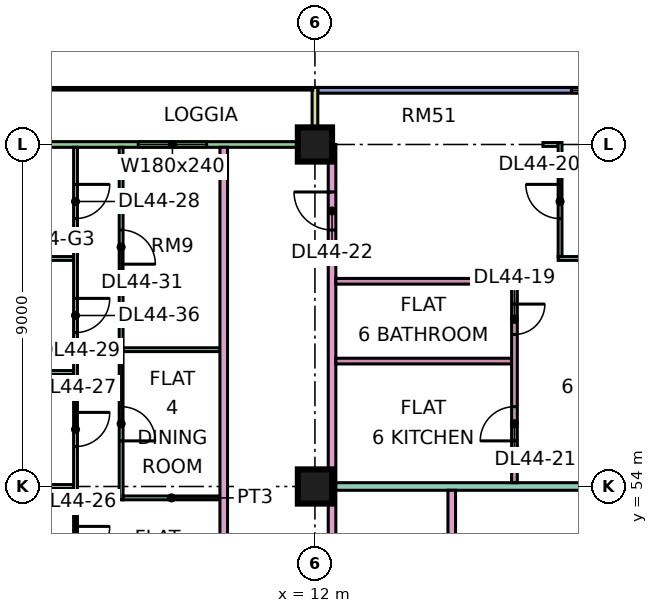
"""IFC4 building model, lengths in metres.
Left out: names, types, materials, properties, quantities, classifications, styles, units other than length and angle.
Written with IfcOpenShell. Run it as: python <this file> out.ifc"""

import sys

from ifc_helpers import new_model, si_unit, direction, frame, frame_2d, origin, origin_2d, place, context, subcontext, project, spatial, rectangle, extrude, element, fill, save


model = new_model("IFC4")
c1 = context("Model", 3, precision=1e-05, world=origin(), true_north=direction((0.0, 1.0)))
c2 = subcontext(c1, "Body", "Model", "MODEL_VIEW")
j1 = project(units=[si_unit("LENGTHUNIT", "METRE"), si_unit("PLANEANGLEUNIT", "RADIAN")], contexts=[c1])
p1 = place(None, origin())
s1 = spatial("IfcSite", under=j1, at=p1, CompositionType="ELEMENT")
p2 = place(p1, origin())
s2 = spatial("IfcBuilding", under=s1, at=p2, CompositionType="ELEMENT")
p3 = place(p2, frame((0.0, 0.0, 191.15)))
s3 = spatial("IfcBuildingStorey", under=s2, at=p3, CompositionType="ELEMENT", Elevation=191.15)
for number, where, z_axis, x_axis in (
    (1, (12.0, 54.0, 0.0), (0.0, 0.0, 1.0), (1.0, 0.0, 0.0)),
    (2, (12.0, 63.0, 0.0), (0.0, 0.0, 1.0), (1.0, 0.0, 0.0)),
):
    element("IfcColumn", number, at=place(p3, frame(where, z_axis=z_axis, x_axis=x_axis)), inside=s3, PredefinedType="COLUMN", context=c2, shape_type="SweptSolid", body=[
        extrude(rectangle(XDim=0.9, YDim=0.9, at=origin_2d()), origin(), (0.0, 0.0, 1.0), 3.75),
    ])
p4 = place(p3, frame((22.5, 64.425, 0.0), z_axis=(0.0, 0.0, 1.0), x_axis=(-1.0, 0.0, 0.0)))
e3 = element("IfcWall", 3, at=p4, inside=s3, PredefinedType="SOLIDWALL", context=c2, shape_type="SweptSolid", body=[
    extrude(rectangle(XDim=10.425, YDim=0.15, at=frame_2d((5.212, 0.0))), origin(), (0.0, 0.0, 1.0), 3.35),
])
p5 = place(p4, frame((0.75, 0.0, 0.45)))
e4 = element("IfcOpeningElement", 4, at=p5, cuts=e3, PredefinedType="OPENING", context=c2, shape_type="SweptSolid", body=[
    extrude(rectangle(XDim=3.0, YDim=2.4, at=frame_2d((1.5, 1.2))), frame((0.0, 0.085, 0.0), z_axis=(0.0, -1.0, 0.0), x_axis=(1.0, 0.0, 0.0)), (0.0, 0.0, 1.0), 0.17),
])
p6 = place(p3, frame((11.925, 63.0, 0.0), z_axis=(0.0, 0.0, 1.0), x_axis=(-1.0, 0.0, 0.0)))
e5 = element("IfcWall", 5, at=p6, inside=s3, PredefinedType="SOLIDWALL", context=c2, shape_type="SweptSolid", body=[
    extrude(rectangle(XDim=10.35, YDim=0.15, at=frame_2d((5.175, 0.0))), origin(), (0.0, 0.0, 1.0), 3.35),
])
p7 = place(p6, frame((2.775, 0.0, 0.45)))
e6 = element("IfcOpeningElement", 6, at=p7, cuts=e5, PredefinedType="OPENING", context=c2, shape_type="SweptSolid", body=[
    extrude(rectangle(XDim=1.8, YDim=2.4, at=frame_2d((0.9, 1.2))), frame((0.0, 0.085, 0.0), z_axis=(0.0, -1.0, 0.0), x_axis=(1.0, 0.0, 0.0)), (0.0, 0.0, 1.0), 0.17),
])
p8 = place(p6, frame((7.387, 0.0, 0.0)))
e7 = element("IfcOpeningElement", 7, at=p8, cuts=e5, PredefinedType="OPENING", context=c2, shape_type="SweptSolid", body=[
    extrude(rectangle(XDim=1.8, YDim=2.4, at=frame_2d((0.9, 1.2))), frame((0.0, 0.085, 0.0), z_axis=(0.0, -1.0, 0.0), x_axis=(1.0, 0.0, 0.0)), (0.0, 0.0, 1.0), 0.17),
])
p9 = place(p3, frame((12.0, 64.5, 0.0), z_axis=(0.0, 0.0, 1.0), x_axis=(0.0, -1.0, 0.0)))
e8 = element("IfcWall", 8, at=p9, inside=s3, PredefinedType="SOLIDWALL", context=c2, shape_type="SweptSolid", body=[
    extrude(rectangle(XDim=1.5, YDim=0.15, at=frame_2d((0.75, 0.0))), origin(), (0.0, 0.0, 1.0), 3.35),
])
for number, where, z_axis, x_axis in (
    (9, (0.074, 54.0, 0.0), (0.0, 0.0, 1.0), (1.0, 0.0, 0.0)),
    (10, (0.074, 57.0, 0.0), (0.0, 0.0, 1.0), (1.0, 0.0, 0.0)),
    (11, (0.074, 60.0, 0.0), (0.0, 0.0, 1.0), (1.0, 0.0, 0.0)),
):
    element("IfcWall", number, at=place(p3, frame(where, z_axis=z_axis, x_axis=x_axis)), inside=s3, PredefinedType="PARTITIONING", context=c2, shape_type="SweptSolid", body=[
        extrude(rectangle(XDim=5.576, YDim=0.1, at=frame_2d((2.788, 0.0))), origin(), (0.0, 0.0, 1.0), 3.35),
    ])
p10 = place(p3, frame((5.7, 36.1, 0.0), z_axis=(0.0, 0.0, 1.0), x_axis=(0.0, 1.0, 0.0)))
e12 = element("IfcWall", 12, at=p10, inside=s3, PredefinedType="PARTITIONING", context=c2, shape_type="SweptSolid", body=[
    extrude(rectangle(XDim=26.826, YDim=0.1, at=frame_2d((13.413, 0.0))), origin(), (0.0, 0.0, 1.0), 3.35),
])
p11 = place(p10, frame((9.95, 0.0, 0.0)))
e13 = element("IfcOpeningElement", 13, at=p11, cuts=e12, PredefinedType="OPENING", context=c2, shape_type="SweptSolid", body=[
    extrude(rectangle(XDim=0.9, YDim=2.1, at=frame_2d((0.45, 1.05))), frame((0.0, 0.06, 0.0), z_axis=(0.0, -1.0, 0.0), x_axis=(1.0, 0.0, 0.0)), (0.0, 0.0, 1.0), 0.12),
])
p12 = place(p10, frame((12.95, 0.0, 0.0)))
e14 = element("IfcOpeningElement", 14, at=p12, cuts=e12, PredefinedType="OPENING", context=c2, shape_type="SweptSolid", body=[
    extrude(rectangle(XDim=0.9, YDim=2.1, at=frame_2d((0.45, 1.05))), frame((0.0, 0.06, 0.0), z_axis=(0.0, -1.0, 0.0), x_axis=(1.0, 0.0, 0.0)), (0.0, 0.0, 1.0), 0.12),
])
p13 = place(p10, frame((15.95, 0.0, 0.0)))
e15 = element("IfcOpeningElement", 15, at=p13, cuts=e12, PredefinedType="OPENING", context=c2, shape_type="SweptSolid", body=[
    extrude(rectangle(XDim=0.9, YDim=2.1, at=frame_2d((0.45, 1.05))), frame((0.0, 0.06, 0.0), z_axis=(0.0, -1.0, 0.0), x_axis=(1.0, 0.0, 0.0)), (0.0, 0.0, 1.0), 0.12),
])
p14 = place(p10, frame((18.95, 0.0, 0.0)))
e16 = element("IfcOpeningElement", 16, at=p14, cuts=e12, PredefinedType="OPENING", context=c2, shape_type="SweptSolid", body=[
    extrude(rectangle(XDim=0.9, YDim=2.1, at=frame_2d((0.45, 1.05))), frame((0.0, 0.06, 0.0), z_axis=(0.0, -1.0, 0.0), x_axis=(1.0, 0.0, 0.0)), (0.0, 0.0, 1.0), 0.12),
])
p15 = place(p10, frame((24.95, 0.0, 0.0)))
e17 = element("IfcOpeningElement", 17, at=p15, cuts=e12, PredefinedType="OPENING", context=c2, shape_type="SweptSolid", body=[
    extrude(rectangle(XDim=0.9, YDim=2.1, at=frame_2d((0.45, 1.05))), frame((0.0, 0.06, 0.0), z_axis=(0.0, -1.0, 0.0), x_axis=(1.0, 0.0, 0.0)), (0.0, 0.0, 1.0), 0.12),
])
p16 = place(p10, frame((3.95, 0.0, 0.0)))
e18 = element("IfcOpeningElement", 18, at=p16, cuts=e12, PredefinedType="OPENING", context=c2, shape_type="SweptSolid", body=[
    extrude(rectangle(XDim=0.9, YDim=2.1, at=frame_2d((0.45, 1.05))), frame((0.0, 0.06, 0.0), z_axis=(0.0, -1.0, 0.0), x_axis=(1.0, 0.0, 0.0)), (0.0, 0.0, 1.0), 0.12),
])
p17 = place(p10, frame((21.95, 0.0, 0.0)))
e19 = element("IfcOpeningElement", 19, at=p17, cuts=e12, PredefinedType="OPENING", context=c2, shape_type="SweptSolid", body=[
    extrude(rectangle(XDim=0.9, YDim=2.1, at=frame_2d((0.45, 1.05))), frame((0.0, 0.06, 0.0), z_axis=(0.0, -1.0, 0.0), x_axis=(1.0, 0.0, 0.0)), (0.0, 0.0, 1.0), 0.12),
])
p18 = place(p3, frame((6.9, 53.65, 0.0), z_axis=(0.0, 0.0, 1.0), x_axis=(0.0, 1.0, 0.0)))
e20 = element("IfcWall", 20, at=p18, inside=s3, PredefinedType="PARTITIONING", context=c2, shape_type="SweptSolid", body=[
    extrude(rectangle(XDim=9.276, YDim=0.1, at=frame_2d((4.638, 0.0))), origin(), (0.0, 0.0, 1.0), 3.35),
])
p19 = place(p18, frame((1.55, 0.0, 0.0)))
e21 = element("IfcOpeningElement", 21, at=p19, cuts=e20, PredefinedType="OPENING", context=c2, shape_type="SweptSolid", body=[
    extrude(rectangle(XDim=0.9, YDim=2.1, at=frame_2d((0.45, 1.05))), frame((0.0, 0.06, 0.0), z_axis=(0.0, -1.0, 0.0), x_axis=(1.0, 0.0, 0.0)), (0.0, 0.0, 1.0), 0.12),
])
p20 = place(p18, frame((6.2, 0.0, 0.0)))
e22 = element("IfcOpeningElement", 22, at=p20, cuts=e20, PredefinedType="OPENING", context=c2, shape_type="SweptSolid", body=[
    extrude(rectangle(XDim=0.9, YDim=2.1, at=frame_2d((0.45, 1.05))), frame((0.0, 0.06, 0.0), z_axis=(0.0, -1.0, 0.0), x_axis=(1.0, 0.0, 0.0)), (0.0, 0.0, 1.0), 0.12),
])
for number, where, z_axis, x_axis in (
    (23, (6.95, 53.7, 0.0), (0.0, 0.0, 1.0), (1.0, 0.0, 0.0)),
    (24, (6.95, 57.6, 0.0), (0.0, 0.0, 1.0), (1.0, 0.0, 0.0)),
):
    element("IfcWall", number, at=place(p3, frame(where, z_axis=z_axis, x_axis=x_axis)), inside=s3, PredefinedType="PARTITIONING", context=c2, shape_type="SweptSolid", body=[
        extrude(rectangle(XDim=2.55, YDim=0.1, at=frame_2d((1.275, 0.0))), origin(), (0.0, 0.0, 1.0), 3.35),
    ])
p21 = place(p3, frame((9.6, 20.0, 0.0), z_axis=(0.0, 0.0, 1.0), x_axis=(0.0, 1.0, 0.0)))
e25 = element("IfcWall", 25, at=p21, inside=s3, PredefinedType="PARTITIONING", context=c2, shape_type="SweptSolid", body=[
    extrude(rectangle(XDim=42.926, YDim=0.2, at=frame_2d((21.463, 0.0))), origin(), (0.0, 0.0, 1.0), 3.35),
])
p22 = place(p21, frame((31.65, 0.0, 0.0)))
e26 = element("IfcOpeningElement", 26, at=p22, cuts=e25, PredefinedType="OPENING", context=c2, shape_type="SweptSolid", body=[
    extrude(rectangle(XDim=1.0, YDim=2.1, at=frame_2d((0.5, 1.05))), frame((0.0, 0.11, 0.0), z_axis=(0.0, -1.0, 0.0), x_axis=(1.0, 0.0, 0.0)), (0.0, 0.0, 1.0), 0.22),
])
p23 = place(p21, frame((0.6, 0.0, 0.0)))
e27 = element("IfcOpeningElement", 27, at=p23, cuts=e25, PredefinedType="OPENING", context=c2, shape_type="SweptSolid", body=[
    extrude(rectangle(XDim=1.2, YDim=2.1, at=frame_2d((0.6, 1.05))), frame((0.0, 0.11, 0.0), z_axis=(0.0, -1.0, 0.0), x_axis=(1.0, 0.0, 0.0)), (0.0, 0.0, 1.0), 0.22),
])
p24 = place(p21, frame((13.65, 0.0, 0.0)))
e28 = element("IfcOpeningElement", 28, at=p24, cuts=e25, PredefinedType="OPENING", context=c2, shape_type="SweptSolid", body=[
    extrude(rectangle(XDim=1.0, YDim=2.1, at=frame_2d((0.5, 1.05))), frame((0.0, 0.11, 0.0), z_axis=(0.0, -1.0, 0.0), x_axis=(1.0, 0.0, 0.0)), (0.0, 0.0, 1.0), 0.22),
])
p25 = place(p3, frame((12.45, 20.0, 0.0), z_axis=(0.0, 0.0, 1.0), x_axis=(0.0, 1.0, 0.0)))
e29 = element("IfcWall", 29, at=p25, inside=s3, PredefinedType="PARTITIONING", context=c2, shape_type="SweptSolid", body=[
    extrude(rectangle(XDim=43.0, YDim=0.2, at=frame_2d((21.5, 0.0))), origin(), (0.0, 0.0, 1.0), 3.35),
])
p26 = place(p25, frame((6.7, 0.0, 0.0)))
e30 = element("IfcOpeningElement", 30, at=p26, cuts=e29, PredefinedType="OPENING", context=c2, shape_type="SweptSolid", body=[
    extrude(rectangle(XDim=1.6, YDim=2.1, at=frame_2d((0.8, 1.05))), frame((0.0, 0.11, 0.0), z_axis=(0.0, -1.0, 0.0), x_axis=(1.0, 0.0, 0.0)), (0.0, 0.0, 1.0), 0.22),
])
p27 = place(p25, frame((12.95, 0.0, 0.0)))
e31 = element("IfcOpeningElement", 31, at=p27, cuts=e29, PredefinedType="OPENING", context=c2, shape_type="SweptSolid", body=[
    extrude(rectangle(XDim=1.0, YDim=2.1, at=frame_2d((0.5, 1.05))), frame((0.0, 0.11, 0.0), z_axis=(0.0, -1.0, 0.0), x_axis=(1.0, 0.0, 0.0)), (0.0, 0.0, 1.0), 0.22),
])
p28 = place(p25, frame((16.9, 0.0, 0.0)))
e32 = element("IfcOpeningElement", 32, at=p28, cuts=e29, PredefinedType="OPENING", context=c2, shape_type="SweptSolid", body=[
    extrude(rectangle(XDim=1.0, YDim=2.1, at=frame_2d((0.5, 1.05))), frame((0.0, 0.11, 0.0), z_axis=(0.0, -1.0, 0.0), x_axis=(1.0, 0.0, 0.0)), (0.0, 0.0, 1.0), 0.22),
])
p29 = place(p25, frame((40.75, 0.0, 0.0)))
e33 = element("IfcOpeningElement", 33, at=p29, cuts=e29, PredefinedType="OPENING", context=c2, shape_type="SweptSolid", body=[
    extrude(rectangle(XDim=1.0, YDim=2.1, at=frame_2d((0.5, 1.05))), frame((0.0, 0.11, 0.0), z_axis=(0.0, -1.0, 0.0), x_axis=(1.0, 0.0, 0.0)), (0.0, 0.0, 1.0), 0.22),
])
p30 = place(p25, frame((1.15, 0.0, 0.0)))
e34 = element("IfcOpeningElement", 34, at=p30, cuts=e29, PredefinedType="OPENING", context=c2, shape_type="SweptSolid", body=[
    extrude(rectangle(XDim=1.8, YDim=2.1, at=frame_2d((0.9, 1.05))), frame((0.0, 0.11, 0.0), z_axis=(0.0, -1.0, 0.0), x_axis=(1.0, 0.0, 0.0)), (0.0, 0.0, 1.0), 0.22),
])
p31 = place(p25, frame((28.6, 0.0, 0.0)))
e35 = element("IfcOpeningElement", 35, at=p31, cuts=e29, PredefinedType="OPENING", context=c2, shape_type="SweptSolid", body=[
    extrude(rectangle(XDim=1.8, YDim=2.1, at=frame_2d((0.9, 1.05))), frame((0.0, 0.11, 0.0), z_axis=(0.0, -1.0, 0.0), x_axis=(1.0, 0.0, 0.0)), (0.0, 0.0, 1.0), 0.22),
])
p32 = place(p3, frame((12.55, 54.0, 0.0), z_axis=(0.0, 0.0, 1.0), x_axis=(1.0, 0.0, 0.0)))
e36 = element("IfcWall", 36, at=p32, inside=s3, PredefinedType="PARTITIONING", context=c2, shape_type="SweptSolid", body=[
    extrude(rectangle(XDim=11.376, YDim=0.2, at=frame_2d((5.688, 0.0))), origin(), (0.0, 0.0, 1.0), 3.35),
])
for number, where, z_axis, x_axis in (
    (37, (12.55, 57.3, 0.0), (0.0, 0.0, 1.0), (1.0, 0.0, 0.0)),
    (38, (12.55, 59.4, 0.0), (0.0, 0.0, 1.0), (1.0, 0.0, 0.0)),
):
    element("IfcWall", number, at=place(p3, frame(where, z_axis=z_axis, x_axis=x_axis)), inside=s3, PredefinedType="PARTITIONING", context=c2, shape_type="SweptSolid", body=[
        extrude(rectangle(XDim=4.625, YDim=0.15, at=frame_2d((2.312, 0.0))), origin(), (0.0, 0.0, 1.0), 3.35),
    ])
p33 = place(p3, frame((15.6, 51.225, 0.0), z_axis=(0.0, 0.0, 1.0), x_axis=(0.0, 1.0, 0.0)))
e39 = element("IfcWall", 39, at=p33, inside=s3, PredefinedType="PARTITIONING", context=c2, shape_type="SweptSolid", body=[
    extrude(rectangle(XDim=2.675, YDim=0.2, at=frame_2d((1.337, 0.0))), origin(), (0.0, 0.0, 1.0), 3.35),
])
p34 = place(p3, frame((17.25, 54.1, 0.0), z_axis=(0.0, 0.0, 1.0), x_axis=(0.0, 1.0, 0.0)))
e40 = element("IfcWall", 40, at=p34, inside=s3, PredefinedType="PARTITIONING", context=c2, shape_type="SweptSolid", body=[
    extrude(rectangle(XDim=5.375, YDim=0.15, at=frame_2d((2.688, 0.0))), origin(), (0.0, 0.0, 1.0), 3.35),
])
p35 = place(p34, frame((3.9, 0.0, 0.0)))
e41 = element("IfcOpeningElement", 41, at=p35, cuts=e40, PredefinedType="OPENING", context=c2, shape_type="SweptSolid", body=[
    extrude(rectangle(XDim=0.8, YDim=2.1, at=frame_2d((0.4, 1.05))), frame((0.0, 0.085, 0.0), z_axis=(0.0, -1.0, 0.0), x_axis=(1.0, 0.0, 0.0)), (0.0, 0.0, 1.0), 0.17),
])
p36 = place(p34, frame((1.1, 0.0, 0.0)))
e42 = element("IfcOpeningElement", 42, at=p36, cuts=e40, PredefinedType="OPENING", context=c2, shape_type="SweptSolid", body=[
    extrude(rectangle(XDim=0.9, YDim=2.1, at=frame_2d((0.45, 1.05))), frame((0.0, 0.085, 0.0), z_axis=(0.0, -1.0, 0.0), x_axis=(1.0, 0.0, 0.0)), (0.0, 0.0, 1.0), 0.17),
])
p37 = place(p3, frame((18.0, 63.0, 0.0), z_axis=(0.0, 0.0, 1.0), x_axis=(1.0, 0.0, 0.0)))
e43 = element("IfcWall", 43, at=p37, inside=s3, PredefinedType="PARTITIONING", context=c2, shape_type="SweptSolid", body=[
    extrude(rectangle(XDim=0.4, YDim=0.1, at=frame_2d((0.2, 0.0))), origin(), (0.0, 0.0, 1.0), 3.35),
])
p38 = place(p3, frame((18.4, 60.0, 0.0), z_axis=(0.0, 0.0, 1.0), x_axis=(1.0, 0.0, 0.0)))
e44 = element("IfcWall", 44, at=p38, inside=s3, PredefinedType="PARTITIONING", context=c2, shape_type="SweptSolid", body=[
    extrude(rectangle(XDim=5.526, YDim=0.1, at=frame_2d((2.763, 0.0))), origin(), (0.0, 0.0, 1.0), 3.35),
])
p39 = place(p3, frame((18.45, 60.05, 0.0), z_axis=(0.0, 0.0, 1.0), x_axis=(0.0, 1.0, 0.0)))
e45 = element("IfcWall", 45, at=p39, inside=s3, PredefinedType="PARTITIONING", context=c2, shape_type="SweptSolid", body=[
    extrude(rectangle(XDim=3.0, YDim=0.1, at=frame_2d((1.5, 0.0))), origin(), (0.0, 0.0, 1.0), 3.35),
])
p40 = place(p39, frame((1.0, 0.0, 0.0)))
e46 = element("IfcOpeningElement", 46, at=p40, cuts=e45, PredefinedType="OPENING", context=c2, shape_type="SweptSolid", body=[
    extrude(rectangle(XDim=0.9, YDim=2.1, at=frame_2d((0.45, 1.05))), frame((0.0, 0.06, 0.0), z_axis=(0.0, -1.0, 0.0), x_axis=(1.0, 0.0, 0.0)), (0.0, 0.0, 1.0), 0.12),
])
p41 = place(p5, origin())
e47 = element("IfcWindow", 47, at=p41, inside=s3, PartitioningType="SINGLE_PANEL", PredefinedType="WINDOW", context=c2, shape_type="SweptSolid", body=[
    extrude(rectangle(XDim=3.0, YDim=2.4, at=frame_2d((1.5, 1.2))), frame((0.0, 0.03, 0.0), z_axis=(0.0, -1.0, 0.0), x_axis=(1.0, 0.0, 0.0)), (0.0, 0.0, 1.0), 0.06),
])
fill(e4, e47)
p42 = place(p7, origin())
e48 = element("IfcWindow", 48, at=p42, inside=s3, PartitioningType="SINGLE_PANEL", PredefinedType="WINDOW", context=c2, shape_type="SweptSolid", body=[
    extrude(rectangle(XDim=1.8, YDim=2.4, at=frame_2d((0.9, 1.2))), frame((0.0, 0.03, 0.0), z_axis=(0.0, -1.0, 0.0), x_axis=(1.0, 0.0, 0.0)), (0.0, 0.0, 1.0), 0.06),
])
fill(e6, e48)
p43 = place(p35, origin())
e49 = element("IfcDoor", 49, at=p43, inside=s3, OperationType="SINGLE_SWING_RIGHT", PredefinedType="DOOR", context=c2, shape_type="SweptSolid", body=[
    extrude(rectangle(XDim=0.8, YDim=2.1, at=frame_2d((0.4, 1.05))), frame((0.0, 0.025, 0.0), z_axis=(0.0, -1.0, 0.0), x_axis=(1.0, 0.0, 0.0)), (0.0, 0.0, 1.0), 0.05),
])
fill(e41, e49)
p44 = place(p40, frame((0.9, 0.0, 0.0), z_axis=(0.0, 0.0, 1.0), x_axis=(-1.0, 0.0, 0.0)))
e50 = element("IfcDoor", 50, at=p44, inside=s3, OperationType="SINGLE_SWING_RIGHT", PredefinedType="DOOR", context=c2, shape_type="SweptSolid", body=[
    extrude(rectangle(XDim=0.9, YDim=2.1, at=frame_2d((0.45, 1.05))), frame((0.0, 0.025, 0.0), z_axis=(0.0, -1.0, 0.0), x_axis=(1.0, 0.0, 0.0)), (0.0, 0.0, 1.0), 0.05),
])
fill(e46, e50)
p45 = place(p36, origin())
e51 = element("IfcDoor", 51, at=p45, inside=s3, OperationType="SINGLE_SWING_LEFT", PredefinedType="DOOR", context=c2, shape_type="SweptSolid", body=[
    extrude(rectangle(XDim=0.9, YDim=2.1, at=frame_2d((0.45, 1.05))), frame((0.0, 0.025, 0.0), z_axis=(0.0, -1.0, 0.0), x_axis=(1.0, 0.0, 0.0)), (0.0, 0.0, 1.0), 0.05),
])
fill(e42, e51)
p46 = place(p29, frame((1.0, 0.0, 0.0), z_axis=(0.0, 0.0, 1.0), x_axis=(-1.0, 0.0, 0.0)))
e52 = element("IfcDoor", 52, at=p46, inside=s3, OperationType="SINGLE_SWING_RIGHT", PredefinedType="DOOR", context=c2, shape_type="SweptSolid", body=[
    extrude(rectangle(XDim=1.0, YDim=2.1, at=frame_2d((0.5, 1.05))), frame((0.0, 0.025, 0.0), z_axis=(0.0, -1.0, 0.0), x_axis=(1.0, 0.0, 0.0)), (0.0, 0.0, 1.0), 0.05),
])
fill(e33, e52)
p47 = place(p13, origin())
e53 = element("IfcDoor", 53, at=p47, inside=s3, OperationType="SINGLE_SWING_RIGHT", PredefinedType="DOOR", context=c2, shape_type="SweptSolid", body=[
    extrude(rectangle(XDim=0.9, YDim=2.1, at=frame_2d((0.45, 1.05))), frame((0.0, 0.025, 0.0), z_axis=(0.0, -1.0, 0.0), x_axis=(1.0, 0.0, 0.0)), (0.0, 0.0, 1.0), 0.05),
])
fill(e15, e53)
p48 = place(p14, origin())
e54 = element("IfcDoor", 54, at=p48, inside=s3, OperationType="SINGLE_SWING_RIGHT", PredefinedType="DOOR", context=c2, shape_type="SweptSolid", body=[
    extrude(rectangle(XDim=0.9, YDim=2.1, at=frame_2d((0.45, 1.05))), frame((0.0, 0.025, 0.0), z_axis=(0.0, -1.0, 0.0), x_axis=(1.0, 0.0, 0.0)), (0.0, 0.0, 1.0), 0.05),
])
fill(e16, e54)
p49 = place(p15, origin())
e55 = element("IfcDoor", 55, at=p49, inside=s3, OperationType="SINGLE_SWING_RIGHT", PredefinedType="DOOR", context=c2, shape_type="SweptSolid", body=[
    extrude(rectangle(XDim=0.9, YDim=2.1, at=frame_2d((0.45, 1.05))), frame((0.0, 0.025, 0.0), z_axis=(0.0, -1.0, 0.0), x_axis=(1.0, 0.0, 0.0)), (0.0, 0.0, 1.0), 0.05),
])
fill(e17, e55)
p50 = place(p19, frame((0.9, 0.0, 0.0), z_axis=(0.0, 0.0, 1.0), x_axis=(-1.0, 0.0, 0.0)))
e56 = element("IfcDoor", 56, at=p50, inside=s3, OperationType="SINGLE_SWING_LEFT", PredefinedType="DOOR", context=c2, shape_type="SweptSolid", body=[
    extrude(rectangle(XDim=0.9, YDim=2.1, at=frame_2d((0.45, 1.05))), frame((0.0, 0.025, 0.0), z_axis=(0.0, -1.0, 0.0), x_axis=(1.0, 0.0, 0.0)), (0.0, 0.0, 1.0), 0.05),
])
fill(e21, e56)
p51 = place(p20, frame((0.9, 0.0, 0.0), z_axis=(0.0, 0.0, 1.0), x_axis=(-1.0, 0.0, 0.0)))
e57 = element("IfcDoor", 57, at=p51, inside=s3, OperationType="SINGLE_SWING_LEFT", PredefinedType="DOOR", context=c2, shape_type="SweptSolid", body=[
    extrude(rectangle(XDim=0.9, YDim=2.1, at=frame_2d((0.45, 1.05))), frame((0.0, 0.025, 0.0), z_axis=(0.0, -1.0, 0.0), x_axis=(1.0, 0.0, 0.0)), (0.0, 0.0, 1.0), 0.05),
])
fill(e22, e57)
p52 = place(p17, origin())
e58 = element("IfcDoor", 58, at=p52, inside=s3, OperationType="SINGLE_SWING_RIGHT", PredefinedType="DOOR", context=c2, shape_type="SweptSolid", body=[
    extrude(rectangle(XDim=0.9, YDim=2.1, at=frame_2d((0.45, 1.05))), frame((0.0, 0.025, 0.0), z_axis=(0.0, -1.0, 0.0), x_axis=(1.0, 0.0, 0.0)), (0.0, 0.0, 1.0), 0.05),
])
fill(e19, e58)
save(model, sys.argv[1])
